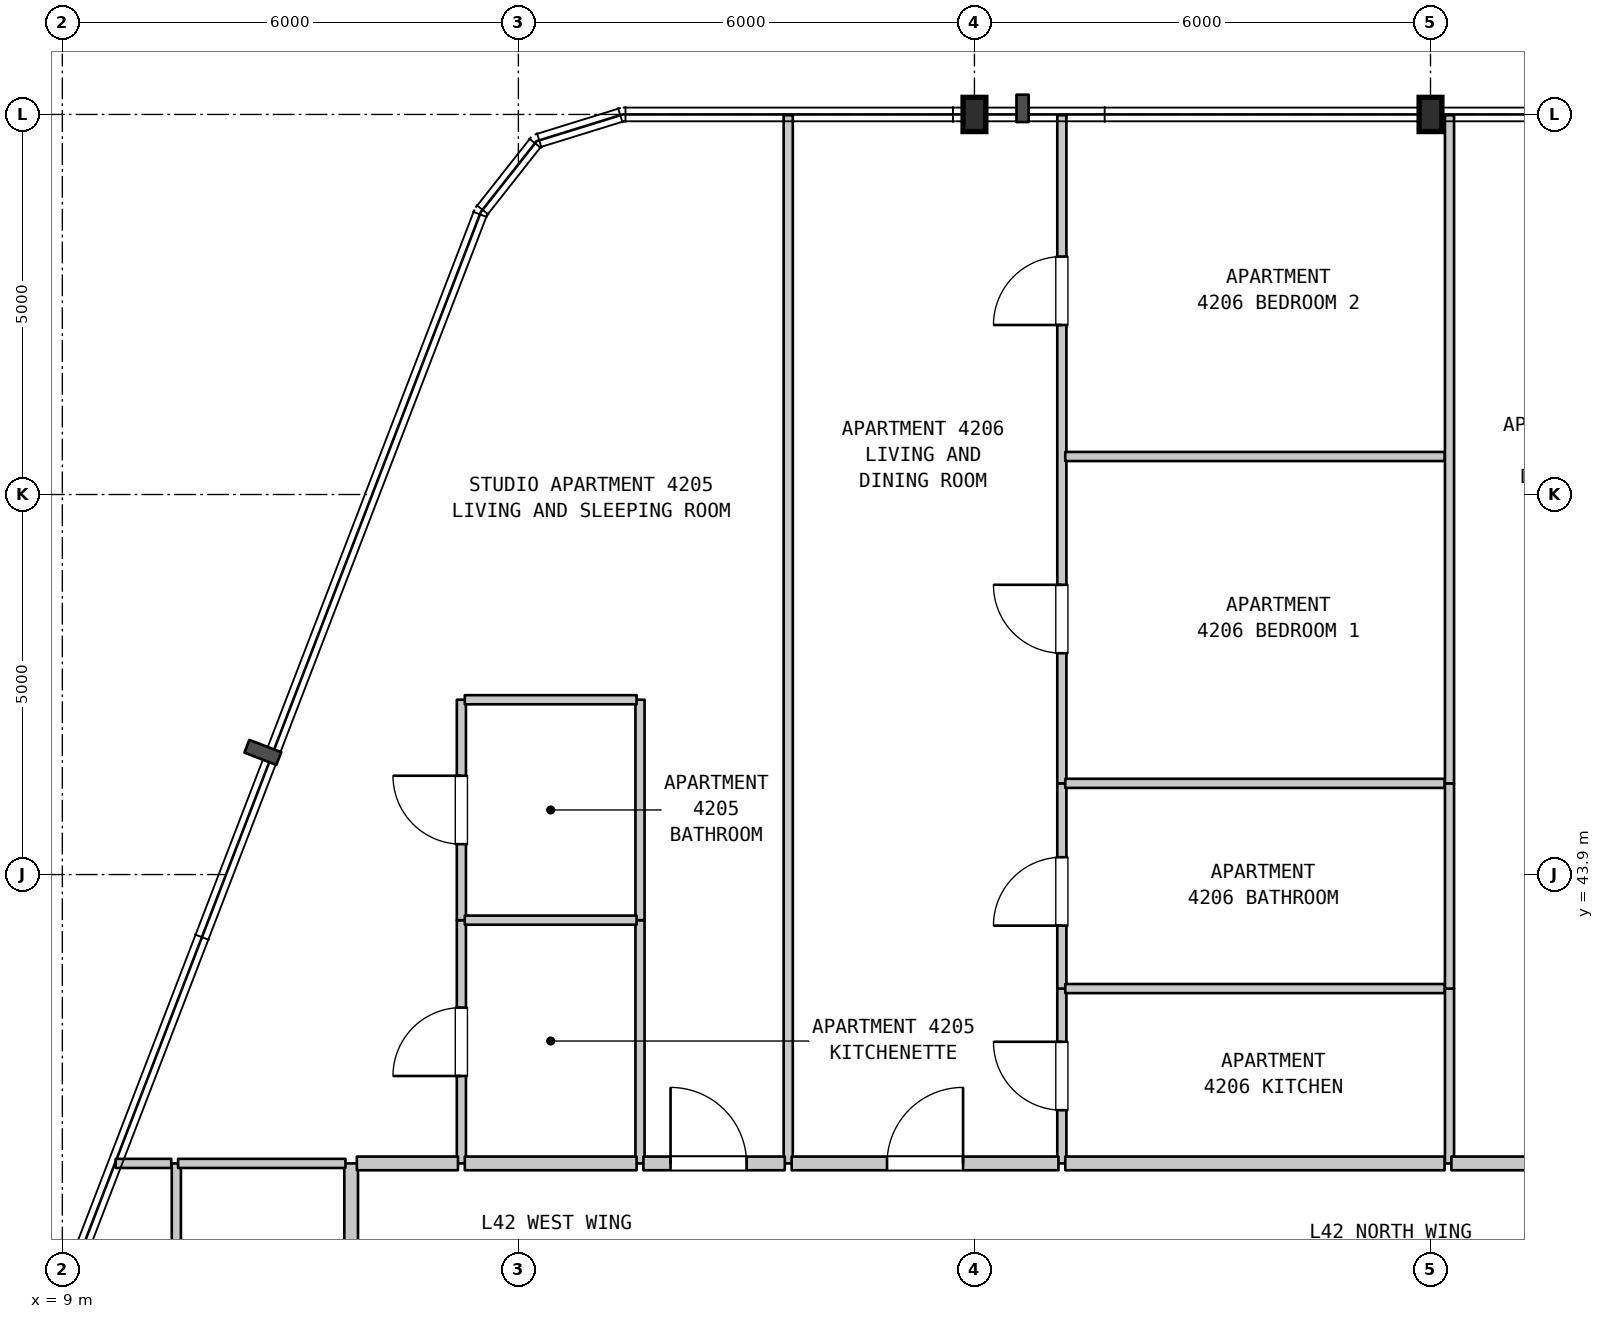
"""IFC4 building model, lengths in metres.
Left out: names, types, materials, properties, quantities, classifications, styles, units other than length and angle.
Written with IfcOpenShell. Run it as: python <this file> out.ifc"""

import sys

from ifc_helpers import new_model, si_unit, direction, frame, frame_2d, origin, origin_2d, place, context, subcontext, project, spatial, rectangle, i_section, extrude, element, fill, save


model = new_model("IFC4")
c1 = context("Model", 3, precision=1e-05, world=origin(), true_north=direction((0.0, 1.0)))
c2 = subcontext(c1, "Body", "Model", "MODEL_VIEW")
j1 = project(units=[si_unit("LENGTHUNIT", "METRE"), si_unit("PLANEANGLEUNIT", "RADIAN")], contexts=[c1])
p1 = place(None, origin())
s1 = spatial("IfcSite", under=j1, at=p1, CompositionType="ELEMENT")
p2 = place(p1, origin())
s2 = spatial("IfcBuilding", under=s1, at=p2, CompositionType="ELEMENT")
p3 = place(p2, frame((0.0, 0.0, 172.8)))
s3 = spatial("IfcBuildingStorey", under=s2, at=p3, CompositionType="ELEMENT", Elevation=172.8)
for number, where, z_axis, x_axis in (
    (1, (21.0, 53.9, 0.0), (0.0, 0.0, 1.0), (1.0, 0.0, 0.0)),
    (2, (27.0, 53.9, 0.0), (0.0, 0.0, 1.0), (1.0, 0.0, 0.0)),
):
    element("IfcColumn", number, at=place(p3, frame(where, z_axis=z_axis, x_axis=x_axis)), inside=s3, PredefinedType="COLUMN", context=c2, shape_type="SweptSolid", body=[
        extrude(i_section(OverallWidth=0.3, OverallDepth=0.45, WebThickness=0.014, FlangeThickness=0.026, FilletRadius=0.027, at=origin_2d()), origin(), (0.0, 0.0, 1.0), 3.7),
    ])
p4 = place(p3, frame((10.5, 31.45, 0.0), z_axis=(0.0, 0.0, 1.0), x_axis=(0.0, 1.0, 0.0)))
e3 = element("IfcWall", 3, at=p4, inside=s3, PredefinedType="PARTITIONING", context=c2, shape_type="SweptSolid", body=[
    extrude(rectangle(XDim=8.65, YDim=0.12, at=frame_2d((4.325, 0.0))), origin(), (0.0, 0.0, 1.0), 3.39),
])
p5 = place(p3, frame((12.8, 31.45, 0.0), z_axis=(0.0, 0.0, 1.0), x_axis=(0.0, 1.0, 0.0)))
e4 = element("IfcWall", 4, at=p5, inside=s3, PredefinedType="STANDARD", context=c2, shape_type="SweptSolid", body=[
    extrude(rectangle(XDim=8.65, YDim=0.18, at=frame_2d((4.325, 0.0))), origin(), (0.0, 0.0, 1.0), 3.39),
])
p6 = place(p3, frame((14.25, 40.1, 0.0), z_axis=(0.0, 0.0, 1.0), x_axis=(0.0, 1.0, 0.0)))
e5 = element("IfcWall", 5, at=p6, inside=s3, PredefinedType="PARTITIONING", context=c2, shape_type="SweptSolid", body=[
    extrude(rectangle(XDim=3.2, YDim=0.12, at=frame_2d((1.6, 0.0))), origin(), (0.0, 0.0, 1.0), 3.39),
])
p7 = place(p6, frame((1.15, 0.0, 0.0)))
e6 = element("IfcOpeningElement", 6, at=p7, cuts=e5, PredefinedType="OPENING", context=c2, shape_type="SweptSolid", body=[
    extrude(rectangle(XDim=0.9, YDim=2.15, at=frame_2d((0.45, 1.075))), frame((0.0, 0.07, 0.0), z_axis=(0.0, -1.0, 0.0), x_axis=(1.0, 0.0, 0.0)), (0.0, 0.0, 1.0), 0.14),
])
p8 = place(p3, frame((14.25, 43.3, 0.0), z_axis=(0.0, 0.0, 1.0), x_axis=(0.0, 1.0, 0.0)))
e7 = element("IfcWall", 7, at=p8, inside=s3, PredefinedType="PARTITIONING", context=c2, shape_type="SweptSolid", body=[
    extrude(rectangle(XDim=2.9, YDim=0.12, at=frame_2d((1.45, 0.0))), origin(), (0.0, 0.0, 1.0), 3.39),
])
p9 = place(p8, frame((1.0, 0.0, 0.0)))
e8 = element("IfcOpeningElement", 8, at=p9, cuts=e7, PredefinedType="OPENING", context=c2, shape_type="SweptSolid", body=[
    extrude(rectangle(XDim=0.9, YDim=2.1, at=frame_2d((0.45, 1.05))), frame((0.0, 0.07, 0.0), z_axis=(0.0, -1.0, 0.0), x_axis=(1.0, 0.0, 0.0)), (0.0, 0.0, 1.0), 0.14),
])
p10 = place(p3, frame((16.6, 40.1, 0.0), z_axis=(0.0, 0.0, 1.0), x_axis=(0.0, 1.0, 0.0)))
e9 = element("IfcWall", 9, at=p10, inside=s3, PredefinedType="PARTITIONING", context=c2, shape_type="SweptSolid", body=[
    extrude(rectangle(XDim=3.2, YDim=0.12, at=frame_2d((1.6, 0.0))), origin(), (0.0, 0.0, 1.0), 3.39),
])
p11 = place(p3, frame((16.6, 43.3, 0.0), z_axis=(0.0, 0.0, 1.0), x_axis=(0.0, 1.0, 0.0)))
e10 = element("IfcWall", 10, at=p11, inside=s3, PredefinedType="PARTITIONING", context=c2, shape_type="SweptSolid", body=[
    extrude(rectangle(XDim=2.9, YDim=0.12, at=frame_2d((1.45, 0.0))), origin(), (0.0, 0.0, 1.0), 3.39),
])
p12 = place(p3, frame((18.55, 40.1, 0.0), z_axis=(0.0, 0.0, 1.0), x_axis=(0.0, 1.0, 0.0)))
e11 = element("IfcWall", 11, at=p12, inside=s3, PredefinedType="PARTITIONING", context=c2, shape_type="SweptSolid", body=[
    extrude(rectangle(XDim=13.79, YDim=0.12, at=frame_2d((6.895, 0.0))), origin(), (0.0, 0.0, 1.0), 3.39),
])
p13 = place(p3, frame((22.15, 40.1, 0.0), z_axis=(0.0, 0.0, 1.0), x_axis=(0.0, 1.0, 0.0)))
e12 = element("IfcWall", 12, at=p13, inside=s3, PredefinedType="PARTITIONING", context=c2, shape_type="SweptSolid", body=[
    extrude(rectangle(XDim=2.3, YDim=0.12, at=frame_2d((1.15, 0.0))), origin(), (0.0, 0.0, 1.0), 3.39),
])
p14 = place(p13, frame((0.7, 0.0, 0.0)))
e13 = element("IfcOpeningElement", 13, at=p14, cuts=e12, PredefinedType="OPENING", context=c2, shape_type="SweptSolid", body=[
    extrude(rectangle(XDim=0.9, YDim=2.15, at=frame_2d((0.45, 1.075))), frame((0.0, 0.07, 0.0), z_axis=(0.0, -1.0, 0.0), x_axis=(1.0, 0.0, 0.0)), (0.0, 0.0, 1.0), 0.14),
])
p15 = place(p3, frame((22.15, 42.4, 0.0), z_axis=(0.0, 0.0, 1.0), x_axis=(0.0, 1.0, 0.0)))
e14 = element("IfcWall", 14, at=p15, inside=s3, PredefinedType="PARTITIONING", context=c2, shape_type="SweptSolid", body=[
    extrude(rectangle(XDim=2.7, YDim=0.12, at=frame_2d((1.35, 0.0))), origin(), (0.0, 0.0, 1.0), 3.39),
])
p16 = place(p15, frame((0.828, 0.0, 0.0)))
e15 = element("IfcOpeningElement", 15, at=p16, cuts=e14, PredefinedType="OPENING", context=c2, shape_type="SweptSolid", body=[
    extrude(rectangle(XDim=0.9, YDim=2.1, at=frame_2d((0.45, 1.05))), frame((0.0, 0.07, 0.0), z_axis=(0.0, -1.0, 0.0), x_axis=(1.0, 0.0, 0.0)), (0.0, 0.0, 1.0), 0.14),
])
p17 = place(p3, frame((22.15, 45.1, 0.0), z_axis=(0.0, 0.0, 1.0), x_axis=(0.0, 1.0, 0.0)))
e16 = element("IfcWall", 16, at=p17, inside=s3, PredefinedType="PARTITIONING", context=c2, shape_type="SweptSolid", body=[
    extrude(rectangle(XDim=8.79, YDim=0.12, at=frame_2d((4.395, 0.0))), origin(), (0.0, 0.0, 1.0), 3.39),
])
p18 = place(p17, frame((1.712, 0.0, 0.0)))
e17 = element("IfcOpeningElement", 17, at=p18, cuts=e16, PredefinedType="OPENING", context=c2, shape_type="SweptSolid", body=[
    extrude(rectangle(XDim=0.9, YDim=2.15, at=frame_2d((0.45, 1.075))), frame((0.0, 0.07, 0.0), z_axis=(0.0, -1.0, 0.0), x_axis=(1.0, 0.0, 0.0)), (0.0, 0.0, 1.0), 0.14),
])
p19 = place(p17, frame((6.03, 0.0, 0.0)))
e18 = element("IfcOpeningElement", 18, at=p19, cuts=e16, PredefinedType="OPENING", context=c2, shape_type="SweptSolid", body=[
    extrude(rectangle(XDim=0.9, YDim=2.15, at=frame_2d((0.45, 1.075))), frame((0.0, 0.07, 0.0), z_axis=(0.0, -1.0, 0.0), x_axis=(1.0, 0.0, 0.0)), (0.0, 0.0, 1.0), 0.14),
])
p20 = place(p3, frame((27.25, 40.1, 0.0), z_axis=(0.0, 0.0, 1.0), x_axis=(0.0, 1.0, 0.0)))
e19 = element("IfcWall", 19, at=p20, inside=s3, PredefinedType="PARTITIONING", context=c2, shape_type="SweptSolid", body=[
    extrude(rectangle(XDim=2.3, YDim=0.12, at=frame_2d((1.15, 0.0))), origin(), (0.0, 0.0, 1.0), 3.39),
])
p21 = place(p3, frame((27.25, 42.4, 0.0), z_axis=(0.0, 0.0, 1.0), x_axis=(0.0, 1.0, 0.0)))
e20 = element("IfcWall", 20, at=p21, inside=s3, PredefinedType="PARTITIONING", context=c2, shape_type="SweptSolid", body=[
    extrude(rectangle(XDim=2.7, YDim=0.12, at=frame_2d((1.35, 0.0))), origin(), (0.0, 0.0, 1.0), 3.39),
])
p22 = place(p3, frame((27.25, 45.1, 0.0), z_axis=(0.0, 0.0, 1.0), x_axis=(0.0, 1.0, 0.0)))
e21 = element("IfcWall", 21, at=p22, inside=s3, PredefinedType="PARTITIONING", context=c2, shape_type="SweptSolid", body=[
    extrude(rectangle(XDim=8.79, YDim=0.12, at=frame_2d((4.395, 0.0))), origin(), (0.0, 0.0, 1.0), 3.39),
])
p23 = place(p3, frame((9.702, 40.1, 0.0), z_axis=(0.0, 0.0, 1.0), x_axis=(1.0, 0.0, 0.0)))
e22 = element("IfcWall", 22, at=p23, inside=s3, PredefinedType="PARTITIONING", context=c2, shape_type="SweptSolid", body=[
    extrude(rectangle(XDim=0.731, YDim=0.12, at=frame_2d((0.366, 0.0))), origin(), (0.0, 0.0, 1.0), 3.39),
])
p24 = place(p3, frame((10.523, 40.1, 0.0), z_axis=(0.0, 0.0, 1.0), x_axis=(1.0, 0.0, 0.0)))
e23 = element("IfcWall", 23, at=p24, inside=s3, PredefinedType="PARTITIONING", context=c2, shape_type="SweptSolid", body=[
    extrude(rectangle(XDim=2.202, YDim=0.12, at=frame_2d((1.101, 0.0))), origin(), (0.0, 0.0, 1.0), 3.39),
])
p25 = place(p3, frame((12.875, 40.1, 0.0), z_axis=(0.0, 0.0, 1.0), x_axis=(1.0, 0.0, 0.0)))
e24 = element("IfcWall", 24, at=p25, inside=s3, PredefinedType="STANDARD", context=c2, shape_type="SweptSolid", body=[
    extrude(rectangle(XDim=1.33, YDim=0.18, at=frame_2d((0.665, 0.0))), origin(), (0.0, 0.0, 1.0), 3.39),
])
p26 = place(p3, frame((14.295, 40.1, 0.0), z_axis=(0.0, 0.0, 1.0), x_axis=(1.0, 0.0, 0.0)))
e25 = element("IfcWall", 25, at=p26, inside=s3, PredefinedType="STANDARD", context=c2, shape_type="SweptSolid", body=[
    extrude(rectangle(XDim=2.26, YDim=0.18, at=frame_2d((1.13, 0.0))), origin(), (0.0, 0.0, 1.0), 3.39),
])
p27 = place(p3, frame((16.645, 40.1, 0.0), z_axis=(0.0, 0.0, 1.0), x_axis=(1.0, 0.0, 0.0)))
e26 = element("IfcWall", 26, at=p27, inside=s3, PredefinedType="STANDARD", context=c2, shape_type="SweptSolid", body=[
    extrude(rectangle(XDim=1.86, YDim=0.18, at=frame_2d((0.93, 0.0))), origin(), (0.0, 0.0, 1.0), 3.39),
])
p28 = place(p27, frame((0.357, 0.0, 0.0)))
e27 = element("IfcOpeningElement", 27, at=p28, cuts=e26, PredefinedType="OPENING", context=c2, shape_type="SweptSolid", body=[
    extrude(rectangle(XDim=1.0, YDim=2.15, at=frame_2d((0.5, 1.075))), frame((0.0, 0.1, 0.0), z_axis=(0.0, -1.0, 0.0), x_axis=(1.0, 0.0, 0.0)), (0.0, 0.0, 1.0), 0.2),
])
p29 = place(p3, frame((18.595, 40.1, 0.0), z_axis=(0.0, 0.0, 1.0), x_axis=(1.0, 0.0, 0.0)))
e28 = element("IfcWall", 28, at=p29, inside=s3, PredefinedType="STANDARD", context=c2, shape_type="SweptSolid", body=[
    extrude(rectangle(XDim=3.51, YDim=0.18, at=frame_2d((1.755, 0.0))), origin(), (0.0, 0.0, 1.0), 3.39),
])
p30 = place(p29, frame((1.255, 0.0, 0.0)))
e29 = element("IfcOpeningElement", 29, at=p30, cuts=e28, PredefinedType="OPENING", context=c2, shape_type="SweptSolid", body=[
    extrude(rectangle(XDim=1.0, YDim=2.15, at=frame_2d((0.5, 1.075))), frame((0.0, 0.1, 0.0), z_axis=(0.0, -1.0, 0.0), x_axis=(1.0, 0.0, 0.0)), (0.0, 0.0, 1.0), 0.2),
])
p31 = place(p3, frame((22.195, 40.1, 0.0), z_axis=(0.0, 0.0, 1.0), x_axis=(1.0, 0.0, 0.0)))
e30 = element("IfcWall", 30, at=p31, inside=s3, PredefinedType="STANDARD", context=c2, shape_type="SweptSolid", body=[
    extrude(rectangle(XDim=4.99, YDim=0.18, at=frame_2d((2.495, 0.0))), origin(), (0.0, 0.0, 1.0), 3.39),
])
p32 = place(p3, frame((27.275, 40.1, 0.0), z_axis=(0.0, 0.0, 1.0), x_axis=(1.0, 0.0, 0.0)))
e31 = element("IfcWall", 31, at=p32, inside=s3, PredefinedType="STANDARD", context=c2, shape_type="SweptSolid", body=[
    extrude(rectangle(XDim=3.51, YDim=0.18, at=frame_2d((1.755, 0.0))), origin(), (0.0, 0.0, 1.0), 3.39),
])
p33 = place(p32, frame((1.255, 0.0, 0.0)))
e32 = element("IfcOpeningElement", 32, at=p33, cuts=e31, PredefinedType="OPENING", context=c2, shape_type="SweptSolid", body=[
    extrude(rectangle(XDim=1.0, YDim=2.15, at=frame_2d((0.5, 1.075))), frame((0.0, 0.1, 0.0), z_axis=(0.0, -1.0, 0.0), x_axis=(1.0, 0.0, 0.0)), (0.0, 0.0, 1.0), 0.2),
])
p34 = place(p3, frame((22.195, 42.4, 0.0), z_axis=(0.0, 0.0, 1.0), x_axis=(1.0, 0.0, 0.0)))
e33 = element("IfcWall", 33, at=p34, inside=s3, PredefinedType="PARTITIONING", context=c2, shape_type="SweptSolid", body=[
    extrude(rectangle(XDim=4.99, YDim=0.12, at=frame_2d((2.495, 0.0))), origin(), (0.0, 0.0, 1.0), 3.39),
])
p35 = place(p3, frame((14.295, 43.3, 0.0), z_axis=(0.0, 0.0, 1.0), x_axis=(1.0, 0.0, 0.0)))
e34 = element("IfcWall", 34, at=p35, inside=s3, PredefinedType="PARTITIONING", context=c2, shape_type="SweptSolid", body=[
    extrude(rectangle(XDim=2.26, YDim=0.12, at=frame_2d((1.13, 0.0))), origin(), (0.0, 0.0, 1.0), 3.39),
])
p36 = place(p3, frame((22.195, 45.1, 0.0), z_axis=(0.0, 0.0, 1.0), x_axis=(1.0, 0.0, 0.0)))
e35 = element("IfcWall", 35, at=p36, inside=s3, PredefinedType="PARTITIONING", context=c2, shape_type="SweptSolid", body=[
    extrude(rectangle(XDim=4.99, YDim=0.12, at=frame_2d((2.495, 0.0))), origin(), (0.0, 0.0, 1.0), 3.39),
])
p37 = place(p3, frame((14.295, 46.2, 0.0), z_axis=(0.0, 0.0, 1.0), x_axis=(1.0, 0.0, 0.0)))
e36 = element("IfcWall", 36, at=p37, inside=s3, PredefinedType="PARTITIONING", context=c2, shape_type="SweptSolid", body=[
    extrude(rectangle(XDim=2.26, YDim=0.12, at=frame_2d((1.13, 0.0))), origin(), (0.0, 0.0, 1.0), 3.39),
])
p38 = place(p3, frame((22.195, 49.4, 0.0), z_axis=(0.0, 0.0, 1.0), x_axis=(1.0, 0.0, 0.0)))
e37 = element("IfcWall", 37, at=p38, inside=s3, PredefinedType="PARTITIONING", context=c2, shape_type="SweptSolid", body=[
    extrude(rectangle(XDim=4.99, YDim=0.12, at=frame_2d((2.495, 0.0))), origin(), (0.0, 0.0, 1.0), 3.39),
])
p39 = place(p7, origin())
e38 = element("IfcDoor", 38, at=p39, inside=s3, OperationType="SINGLE_SWING_LEFT", PredefinedType="DOOR", context=c2, shape_type="SweptSolid", body=[
    extrude(rectangle(XDim=0.9, YDim=2.15, at=frame_2d((0.45, 1.075))), frame((0.0, 0.025, 0.0), z_axis=(0.0, -1.0, 0.0), x_axis=(1.0, 0.0, 0.0)), (0.0, 0.0, 1.0), 0.05),
])
fill(e6, e38)
p40 = place(p9, origin())
e39 = element("IfcDoor", 39, at=p40, inside=s3, OperationType="SINGLE_SWING_RIGHT", PredefinedType="DOOR", context=c2, shape_type="SweptSolid", body=[
    extrude(rectangle(XDim=0.9, YDim=2.1, at=frame_2d((0.45, 1.05))), frame((0.0, 0.025, 0.0), z_axis=(0.0, -1.0, 0.0), x_axis=(1.0, 0.0, 0.0)), (0.0, 0.0, 1.0), 0.05),
])
fill(e8, e39)
p41 = place(p14, origin())
e40 = element("IfcDoor", 40, at=p41, inside=s3, OperationType="SINGLE_SWING_RIGHT", PredefinedType="DOOR", context=c2, shape_type="SweptSolid", body=[
    extrude(rectangle(XDim=0.9, YDim=2.15, at=frame_2d((0.45, 1.075))), frame((0.0, 0.025, 0.0), z_axis=(0.0, -1.0, 0.0), x_axis=(1.0, 0.0, 0.0)), (0.0, 0.0, 1.0), 0.05),
])
fill(e13, e40)
p42 = place(p16, origin())
e41 = element("IfcDoor", 41, at=p42, inside=s3, OperationType="SINGLE_SWING_LEFT", PredefinedType="DOOR", context=c2, shape_type="SweptSolid", body=[
    extrude(rectangle(XDim=0.9, YDim=2.1, at=frame_2d((0.45, 1.05))), frame((0.0, 0.025, 0.0), z_axis=(0.0, -1.0, 0.0), x_axis=(1.0, 0.0, 0.0)), (0.0, 0.0, 1.0), 0.05),
])
fill(e15, e41)
p43 = place(p18, origin())
e42 = element("IfcDoor", 42, at=p43, inside=s3, OperationType="SINGLE_SWING_RIGHT", PredefinedType="DOOR", context=c2, shape_type="SweptSolid", body=[
    extrude(rectangle(XDim=0.9, YDim=2.15, at=frame_2d((0.45, 1.075))), frame((0.0, 0.025, 0.0), z_axis=(0.0, -1.0, 0.0), x_axis=(1.0, 0.0, 0.0)), (0.0, 0.0, 1.0), 0.05),
])
fill(e17, e42)
p44 = place(p19, origin())
e43 = element("IfcDoor", 43, at=p44, inside=s3, OperationType="SINGLE_SWING_LEFT", PredefinedType="DOOR", context=c2, shape_type="SweptSolid", body=[
    extrude(rectangle(XDim=0.9, YDim=2.15, at=frame_2d((0.45, 1.075))), frame((0.0, 0.025, 0.0), z_axis=(0.0, -1.0, 0.0), x_axis=(1.0, 0.0, 0.0)), (0.0, 0.0, 1.0), 0.05),
])
fill(e18, e43)
p45 = place(p28, origin())
e44 = element("IfcDoor", 44, at=p45, inside=s3, OperationType="SINGLE_SWING_LEFT", PredefinedType="DOOR", context=c2, shape_type="SweptSolid", body=[
    extrude(rectangle(XDim=1.0, YDim=2.15, at=frame_2d((0.5, 1.075))), frame((0.0, 0.025, 0.0), z_axis=(0.0, -1.0, 0.0), x_axis=(1.0, 0.0, 0.0)), (0.0, 0.0, 1.0), 0.05),
])
fill(e27, e44)
p46 = place(p30, origin())
e45 = element("IfcDoor", 45, at=p46, inside=s3, OperationType="SINGLE_SWING_RIGHT", PredefinedType="DOOR", context=c2, shape_type="SweptSolid", body=[
    extrude(rectangle(XDim=1.0, YDim=2.15, at=frame_2d((0.5, 1.075))), frame((0.0, 0.025, 0.0), z_axis=(0.0, -1.0, 0.0), x_axis=(1.0, 0.0, 0.0)), (0.0, 0.0, 1.0), 0.05),
])
fill(e29, e45)
save(model, sys.argv[1])
